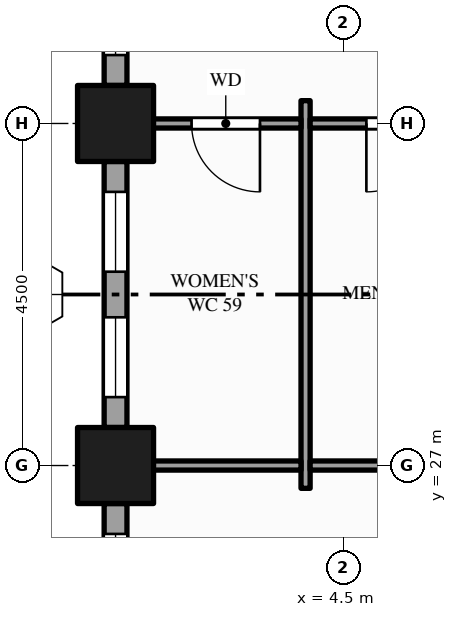
"""IFC4 building model, lengths in metres.
Left out: names, types, materials, properties, quantities, classifications, styles, units other than length and angle.
Written with IfcOpenShell. Run it as: python <this file> out.ifc"""

import sys

from ifc_helpers import new_model, si_unit, direction, frame, frame_2d, origin, origin_2d, place, context, subcontext, project, spatial, rectangle, hollow_rectangle, extrude, element, fill, save


model = new_model("IFC4")
c1 = context("Model", 3, precision=1e-05, world=origin(), true_north=direction((0.0, 1.0)))
c2 = subcontext(c1, "Body", "Model", "MODEL_VIEW")
j1 = project(units=[si_unit("LENGTHUNIT", "METRE"), si_unit("PLANEANGLEUNIT", "RADIAN")], contexts=[c1])
p1 = place(None, origin())
s1 = spatial("IfcSite", under=j1, at=p1, CompositionType="ELEMENT")
p2 = place(p1, origin())
s2 = spatial("IfcBuilding", under=s1, at=p2, CompositionType="ELEMENT")
p3 = place(p2, frame((0.0, 0.0, 107.0)))
s3 = spatial("IfcBuildingStorey", under=s2, at=p3, CompositionType="ELEMENT", Elevation=107.0)
for number, where, z_axis, x_axis in (
    (1, (1.5, 27.0, -0.15), (0.0, 0.0, 1.0), (1.0, 0.0, 0.0)),
    (2, (1.5, 31.5, -0.15), (0.0, 0.0, 1.0), (1.0, 0.0, 0.0)),
):
    element("IfcColumn", number, at=place(p3, frame(where, z_axis=z_axis, x_axis=x_axis)), inside=s3, PredefinedType="COLUMN", context=c2, shape_type="SweptSolid", body=[
        extrude(hollow_rectangle(XDim=1.0, YDim=1.0, WallThickness=0.05, at=origin_2d()), origin(), (0.0, 0.0, 1.0), 4.0),
    ])
p4 = place(p3, frame((1.5, 36.0, 0.0), z_axis=(0.0, 0.0, 1.0), x_axis=(0.0, -1.0, 0.0)))
e3 = element("IfcWall", 3, at=p4, inside=s3, PredefinedType="STANDARD", context=c2, shape_type="SweptSolid", body=[
    extrude(rectangle(XDim=4.0, YDim=0.3, at=frame_2d((2.0, 0.0))), origin(), (0.0, 0.0, 1.0), 3.154),
])
p5 = place(p4, frame((0.4, 0.0, 0.9)))
e4 = element("IfcOpeningElement", 4, at=p5, cuts=e3, PredefinedType="OPENING", context=c2, shape_type="SweptSolid", body=[
    extrude(rectangle(XDim=1.55, YDim=2.0, at=frame_2d((0.775, 1.0))), frame((0.0, 0.16, 0.0), z_axis=(0.0, -1.0, 0.0), x_axis=(1.0, 0.0, 0.0)), (0.0, 0.0, 1.0), 0.32),
])
p6 = place(p4, frame((2.55, 0.0, 0.9)))
e5 = element("IfcOpeningElement", 5, at=p6, cuts=e3, PredefinedType="OPENING", context=c2, shape_type="SweptSolid", body=[
    extrude(rectangle(XDim=1.05, YDim=2.0, at=frame_2d((0.525, 1.0))), frame((0.0, 0.16, 0.0), z_axis=(0.0, -1.0, 0.0), x_axis=(1.0, 0.0, 0.0)), (0.0, 0.0, 1.0), 0.32),
])
p7 = place(p3, frame((1.5, 31.0, 0.0), z_axis=(0.0, 0.0, 1.0), x_axis=(0.0, -1.0, 0.0)))
e6 = element("IfcWall", 6, at=p7, inside=s3, PredefinedType="STANDARD", context=c2, shape_type="SweptSolid", body=[
    extrude(rectangle(XDim=3.5, YDim=0.3, at=frame_2d((1.75, 0.0))), origin(), (0.0, 0.0, 1.0), 3.154),
])
p8 = place(p7, frame((0.4, 0.0, 0.9)))
e7 = element("IfcOpeningElement", 7, at=p8, cuts=e6, PredefinedType="OPENING", context=c2, shape_type="SweptSolid", body=[
    extrude(rectangle(XDim=1.05, YDim=2.0, at=frame_2d((0.525, 1.0))), frame((0.0, 0.16, 0.0), z_axis=(0.0, -1.0, 0.0), x_axis=(1.0, 0.0, 0.0)), (0.0, 0.0, 1.0), 0.32),
])
p9 = place(p7, frame((2.05, 0.0, 0.9)))
e8 = element("IfcOpeningElement", 8, at=p9, cuts=e6, PredefinedType="OPENING", context=c2, shape_type="SweptSolid", body=[
    extrude(rectangle(XDim=1.05, YDim=2.0, at=frame_2d((0.525, 1.0))), frame((0.0, 0.16, 0.0), z_axis=(0.0, -1.0, 0.0), x_axis=(1.0, 0.0, 0.0)), (0.0, 0.0, 1.0), 0.32),
])
p10 = place(p3, frame((1.5, 26.5, 0.0), z_axis=(0.0, 0.0, 1.0), x_axis=(0.0, -1.0, 0.0)))
e9 = element("IfcWall", 9, at=p10, inside=s3, PredefinedType="STANDARD", context=c2, shape_type="SweptSolid", body=[
    extrude(rectangle(XDim=3.5, YDim=0.3, at=frame_2d((1.75, 0.0))), origin(), (0.0, 0.0, 1.0), 3.154),
])
p11 = place(p10, frame((0.4, 0.0, 0.9)))
e10 = element("IfcOpeningElement", 10, at=p11, cuts=e9, PredefinedType="OPENING", context=c2, shape_type="SweptSolid", body=[
    extrude(rectangle(XDim=1.05, YDim=2.0, at=frame_2d((0.525, 1.0))), frame((0.0, 0.16, 0.0), z_axis=(0.0, -1.0, 0.0), x_axis=(1.0, 0.0, 0.0)), (0.0, 0.0, 1.0), 0.32),
])
p12 = place(p10, frame((2.05, 0.0, 0.9)))
e11 = element("IfcOpeningElement", 11, at=p12, cuts=e9, PredefinedType="OPENING", context=c2, shape_type="SweptSolid", body=[
    extrude(rectangle(XDim=1.05, YDim=2.0, at=frame_2d((0.525, 1.0))), frame((0.0, 0.16, 0.0), z_axis=(0.0, -1.0, 0.0), x_axis=(1.0, 0.0, 0.0)), (0.0, 0.0, 1.0), 0.32),
])
p13 = place(p3, frame((4.0, 26.7, 0.0), z_axis=(0.0, 0.0, 1.0), x_axis=(0.0, 1.0, 0.0)))
e12 = element("IfcWall", 12, at=p13, inside=s3, PredefinedType="PARTITIONING", context=c2, shape_type="SweptSolid", body=[
    extrude(rectangle(XDim=5.1, YDim=0.12, at=frame_2d((2.55, 0.0))), origin(), (0.0, 0.0, 1.0), 3.85),
])
p14 = place(p3, frame((1.65, 27.0, 0.0), z_axis=(0.0, 0.0, 1.0), x_axis=(1.0, 0.0, 0.0)))
e13 = element("IfcWall", 13, at=p14, inside=s3, PredefinedType="PARTITIONING", context=c2, shape_type="SweptSolid", body=[
    extrude(rectangle(XDim=2.29, YDim=0.12, at=frame_2d((1.145, 0.0))), origin(), (0.0, 0.0, 1.0), 2.938),
])
p15 = place(p3, frame((4.06, 27.0, 0.0), z_axis=(0.0, 0.0, 1.0), x_axis=(1.0, 0.0, 0.0)))
e14 = element("IfcWall", 14, at=p15, inside=s3, PredefinedType="PARTITIONING", context=c2, shape_type="SweptSolid", body=[
    extrude(rectangle(XDim=2.38, YDim=0.12, at=frame_2d((1.19, 0.0))), origin(), (0.0, 0.0, 1.0), 2.938),
])
p16 = place(p3, frame((1.65, 31.5, 0.0), z_axis=(0.0, 0.0, 1.0), x_axis=(1.0, 0.0, 0.0)))
e15 = element("IfcWall", 15, at=p16, inside=s3, PredefinedType="PARTITIONING", context=c2, shape_type="SweptSolid", body=[
    extrude(rectangle(XDim=2.29, YDim=0.12, at=frame_2d((1.145, 0.0))), origin(), (0.0, 0.0, 1.0), 2.938),
])
p17 = place(p16, frame((0.85, 0.0, 0.0)))
e16 = element("IfcOpeningElement", 16, at=p17, cuts=e15, PredefinedType="OPENING", context=c2, shape_type="SweptSolid", body=[
    extrude(rectangle(XDim=0.9, YDim=2.1, at=frame_2d((0.45, 1.05))), frame((0.0, 0.07, 0.0), z_axis=(0.0, -1.0, 0.0), x_axis=(1.0, 0.0, 0.0)), (0.0, 0.0, 1.0), 0.14),
])
p18 = place(p3, frame((4.06, 31.5, 0.0), z_axis=(0.0, 0.0, 1.0), x_axis=(1.0, 0.0, 0.0)))
e17 = element("IfcWall", 17, at=p18, inside=s3, PredefinedType="PARTITIONING", context=c2, shape_type="SweptSolid", body=[
    extrude(rectangle(XDim=2.38, YDim=0.12, at=frame_2d((1.19, 0.0))), origin(), (0.0, 0.0, 1.0), 2.938),
])
p19 = place(p18, frame((0.74, 0.0, 0.0)))
e18 = element("IfcOpeningElement", 18, at=p19, cuts=e17, PredefinedType="OPENING", context=c2, shape_type="SweptSolid", body=[
    extrude(rectangle(XDim=0.9, YDim=2.1, at=frame_2d((0.45, 1.05))), frame((0.0, 0.07, 0.0), z_axis=(0.0, -1.0, 0.0), x_axis=(1.0, 0.0, 0.0)), (0.0, 0.0, 1.0), 0.14),
])
p20 = place(p6, origin())
e19 = element("IfcWindow", 19, at=p20, inside=s3, PartitioningType="SINGLE_PANEL", PredefinedType="WINDOW", context=c2, shape_type="SweptSolid", body=[
    extrude(rectangle(XDim=1.05, YDim=2.0, at=frame_2d((0.525, 1.0))), frame((0.0, 0.03, 0.0), z_axis=(0.0, -1.0, 0.0), x_axis=(1.0, 0.0, 0.0)), (0.0, 0.0, 1.0), 0.06),
])
fill(e5, e19)
p21 = place(p8, origin())
e20 = element("IfcWindow", 20, at=p21, inside=s3, PartitioningType="SINGLE_PANEL", PredefinedType="WINDOW", context=c2, shape_type="SweptSolid", body=[
    extrude(rectangle(XDim=1.05, YDim=2.0, at=frame_2d((0.525, 1.0))), frame((0.0, 0.03, 0.0), z_axis=(0.0, -1.0, 0.0), x_axis=(1.0, 0.0, 0.0)), (0.0, 0.0, 1.0), 0.06),
])
fill(e7, e20)
p22 = place(p9, origin())
e21 = element("IfcWindow", 21, at=p22, inside=s3, PartitioningType="SINGLE_PANEL", PredefinedType="WINDOW", context=c2, shape_type="SweptSolid", body=[
    extrude(rectangle(XDim=1.05, YDim=2.0, at=frame_2d((0.525, 1.0))), frame((0.0, 0.03, 0.0), z_axis=(0.0, -1.0, 0.0), x_axis=(1.0, 0.0, 0.0)), (0.0, 0.0, 1.0), 0.06),
])
fill(e8, e21)
p23 = place(p11, origin())
e22 = element("IfcWindow", 22, at=p23, inside=s3, PartitioningType="SINGLE_PANEL", PredefinedType="WINDOW", context=c2, shape_type="SweptSolid", body=[
    extrude(rectangle(XDim=1.05, YDim=2.0, at=frame_2d((0.525, 1.0))), frame((0.0, 0.03, 0.0), z_axis=(0.0, -1.0, 0.0), x_axis=(1.0, 0.0, 0.0)), (0.0, 0.0, 1.0), 0.06),
])
fill(e10, e22)
p24 = place(p17, origin())
e23 = element("IfcDoor", 23, at=p24, inside=s3, OperationType="SINGLE_SWING_RIGHT", PredefinedType="DOOR", context=c2, shape_type="SweptSolid", body=[
    extrude(rectangle(XDim=0.9, YDim=2.1, at=frame_2d((0.45, 1.05))), frame((0.0, 0.025, 0.0), z_axis=(0.0, -1.0, 0.0), x_axis=(1.0, 0.0, 0.0)), (0.0, 0.0, 1.0), 0.05),
])
fill(e16, e23)
p25 = place(p19, origin())
e24 = element("IfcDoor", 24, at=p25, inside=s3, OperationType="SINGLE_SWING_LEFT", PredefinedType="DOOR", context=c2, shape_type="SweptSolid", body=[
    extrude(rectangle(XDim=0.9, YDim=2.1, at=frame_2d((0.45, 1.05))), frame((0.0, 0.025, 0.0), z_axis=(0.0, -1.0, 0.0), x_axis=(1.0, 0.0, 0.0)), (0.0, 0.0, 1.0), 0.05),
])
fill(e18, e24)
save(model, sys.argv[1])
